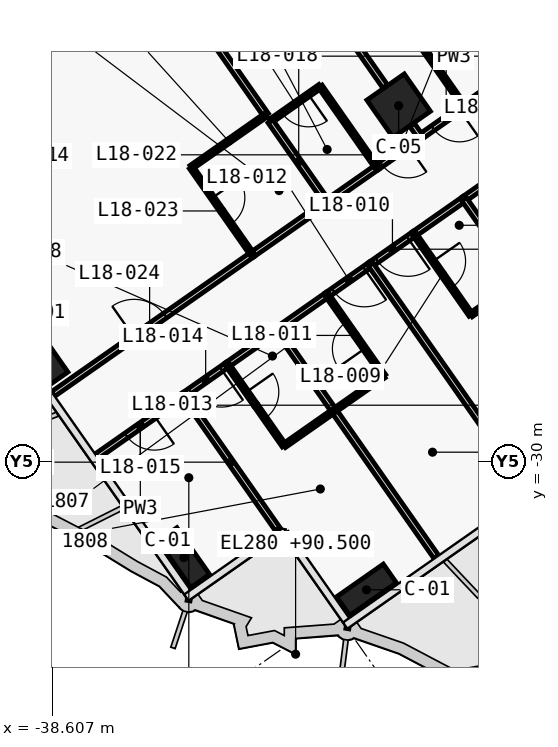
"""IFC4 building model, lengths in metres.
Left out: names, types, materials, properties, quantities, classifications, styles, units other than length and angle.
Written with IfcOpenShell. Run it as: python <this file> out.ifc"""

import sys

from ifc_helpers import new_model, si_unit, direction, frame, frame_2d, origin, origin_2d, place, context, subcontext, project, spatial, rectangle, extrude, element, fill, save


model = new_model("IFC4")
c1 = context("Model", 3, precision=1e-05, world=origin(), true_north=direction((0.0, 1.0)))
c2 = subcontext(c1, "Body", "Model", "MODEL_VIEW")
j1 = project(units=[si_unit("LENGTHUNIT", "METRE"), si_unit("PLANEANGLEUNIT", "RADIAN")], contexts=[c1])
p1 = place(None, origin())
s1 = spatial("IfcSite", under=j1, at=p1, CompositionType="ELEMENT")
p2 = place(p1, origin())
s2 = spatial("IfcBuilding", under=s1, at=p2, CompositionType="ELEMENT")
p3 = place(p2, frame((0.0, 0.0, 90.5)))
s3 = spatial("IfcBuildingStorey", under=s2, at=p3, CompositionType="ELEMENT", Elevation=90.5)
for number, where, z_axis, x_axis in (
    (1, (-30.336, -33.388, 0.0), (0.0, 0.0, 1.0), (-0.819, -0.574, 0.0)),
    (2, (-35.14, -32.541, 0.0), (0.0, 0.0, 1.0), (-0.574, 0.819, 0.0)),
    (3, (-38.869, -27.216, 0.0), (0.0, 0.0, 1.0), (-0.574, 0.819, 0.0)),
):
    element("IfcColumn", number, at=place(p3, frame(where, z_axis=z_axis, x_axis=x_axis)), inside=s3, PredefinedType="COLUMN", context=c2, shape_type="SweptSolid", body=[
        extrude(rectangle(XDim=1.5, YDim=0.6, at=origin_2d()), origin(), (0.0, 0.0, 1.0), 3.6),
    ])
p4 = place(p3, frame((-29.49, -20.649, 0.0), z_axis=(0.0, 0.0, 1.0), x_axis=(-0.819152044289, -0.573576436351, 0.0)))
e4 = element("IfcColumn", 4, at=p4, inside=s3, PredefinedType="COLUMN", context=c2, shape_type="SweptSolid", body=[
    extrude(rectangle(XDim=1.2, YDim=1.2, at=origin_2d()), origin(), (0.0, 0.0, 1.0), 3.6),
])
p5 = place(p3, frame((-27.768, -20.664, 0.0), z_axis=(0.0, 0.0, 1.0), x_axis=(-0.81914197737, -0.573590813132, 0.0)))
e5 = element("IfcWall", 5, at=p5, inside=s3, PredefinedType="PARTITIONING", context=c2, shape_type="SweptSolid", body=[
    extrude(rectangle(XDim=1.403, YDim=0.15, at=frame_2d((0.701, 0.0))), origin(), (0.0, 0.0, 1.0), 2.6),
])
p6 = place(p5, frame((0.15, 0.0, 0.0)))
e6 = element("IfcOpeningElement", 6, at=p6, cuts=e5, PredefinedType="OPENING", context=c2, shape_type="SweptSolid", body=[
    extrude(rectangle(XDim=0.85, YDim=2.1, at=frame_2d((0.425, 1.05))), frame((0.0, 0.085, 0.0), z_axis=(0.0, -1.0, 0.0), x_axis=(1.0, 0.0, 0.0)), (0.0, 0.0, 1.0), 0.17),
])
p7 = place(p3, frame((-27.771, -20.666, 0.0), z_axis=(0.0, 0.0, 1.0), x_axis=(0.819189013667, 0.573523634986, 0.0)))
e7 = element("IfcWall", 7, at=p7, inside=s3, PredefinedType="PARTITIONING", context=c2, shape_type="SweptSolid", body=[
    extrude(rectangle(XDim=1.604, YDim=0.15, at=frame_2d((0.802, 0.0))), origin(), (0.0, 0.0, 1.0), 3.32),
])
p8 = place(p3, frame((-28.914, -21.467, 0.0), z_axis=(0.0, 0.0, 1.0), x_axis=(-0.81914197737, -0.573590813132, 0.0)))
e8 = element("IfcWall", 8, at=p8, inside=s3, PredefinedType="PARTITIONING", context=c2, shape_type="SweptSolid", body=[
    extrude(rectangle(XDim=1.403, YDim=0.15, at=frame_2d((0.701, 0.0))), origin(), (0.0, 0.0, 1.0), 2.6),
])
p9 = place(p8, frame((0.403, 0.0, 0.0)))
e9 = element("IfcOpeningElement", 9, at=p9, cuts=e8, PredefinedType="OPENING", context=c2, shape_type="SweptSolid", body=[
    extrude(rectangle(XDim=0.85, YDim=2.1, at=frame_2d((0.425, 1.05))), frame((0.0, 0.085, 0.0), z_axis=(0.0, -1.0, 0.0), x_axis=(1.0, 0.0, 0.0)), (0.0, 0.0, 1.0), 0.17),
])
p10 = place(p3, frame((-31.375, -23.19, 0.0), z_axis=(0.0, 0.0, 1.0), x_axis=(0.819189013667, 0.573523634986, 0.0)))
e10 = element("IfcWall", 10, at=p10, inside=s3, PredefinedType="PARTITIONING", context=c2, shape_type="SweptSolid", body=[
    extrude(rectangle(XDim=1.604, YDim=0.15, at=frame_2d((0.802, 0.0))), origin(), (0.0, 0.0, 1.0), 3.32),
])
p11 = place(p3, frame((-38.582, -28.236, 0.0), z_axis=(0.0, 0.0, 1.0), x_axis=(0.819158447199, 0.573567291939, 0.0)))
e11 = element("IfcWall", 11, at=p11, inside=s3, PredefinedType="PARTITIONING", context=c2, shape_type="SweptSolid", body=[
    extrude(rectangle(XDim=6.401, YDim=0.15, at=frame_2d((3.2, 0.0))), origin(), (0.0, 0.0, 1.0), 2.5),
])
p12 = place(p11, frame((2.6, 0.0, 0.0)))
e12 = element("IfcOpeningElement", 12, at=p12, cuts=e11, PredefinedType="OPENING", context=c2, shape_type="SweptSolid", body=[
    extrude(rectangle(XDim=1.0, YDim=2.1, at=frame_2d((0.5, 1.05))), frame((0.0, 0.085, 0.0), z_axis=(0.0, -1.0, 0.0), x_axis=(1.0, 0.0, 0.0)), (0.0, 0.0, 1.0), 0.17),
])
p13 = place(p3, frame((-33.341, -24.566, 0.0), z_axis=(0.0, 0.0, 1.0), x_axis=(0.819179439794, 0.573537309527, 0.0)))
e13 = element("IfcWall", 13, at=p13, inside=s3, PredefinedType="PARTITIONING", context=c2, shape_type="SweptSolid", body=[
    extrude(rectangle(XDim=2.404, YDim=0.15, at=frame_2d((1.202, 0.0))), origin(), (0.0, 0.0, 1.0), 3.32),
])
p14 = place(p3, frame((-25.801, -21.729, 0.0), z_axis=(0.0, 0.0, 1.0), x_axis=(-0.819179439794, -0.573537309527, 0.0)))
e14 = element("IfcWall", 14, at=p14, inside=s3, PredefinedType="PARTITIONING", context=c2, shape_type="SweptSolid", body=[
    extrude(rectangle(XDim=2.404, YDim=0.15, at=frame_2d((1.202, 0.0))), origin(), (0.0, 0.0, 1.0), 2.6),
])
p15 = place(p3, frame((-29.079, -24.023, 0.0), z_axis=(0.0, 0.0, 1.0), x_axis=(-0.81914197737, -0.573590813132, 0.0)))
e15 = element("IfcWall", 15, at=p15, inside=s3, PredefinedType="PARTITIONING", context=c2, shape_type="SweptSolid", body=[
    extrude(rectangle(XDim=1.403, YDim=0.15, at=frame_2d((0.701, 0.0))), origin(), (0.0, 0.0, 1.0), 3.32),
])
p16 = place(p15, frame((0.201, 0.0, 0.0)))
e16 = element("IfcOpeningElement", 16, at=p16, cuts=e15, PredefinedType="OPENING", context=c2, shape_type="SweptSolid", body=[
    extrude(rectangle(XDim=1.0, YDim=2.1, at=frame_2d((0.5, 1.05))), frame((0.0, 0.085, 0.0), z_axis=(0.0, -1.0, 0.0), x_axis=(1.0, 0.0, 0.0)), (0.0, 0.0, 1.0), 0.17),
])
p17 = place(p3, frame((-27.767, -23.105, 0.0), z_axis=(0.0, 0.0, 1.0), x_axis=(-0.819117502046, -0.573625764625, 0.0)))
e17 = element("IfcWall", 17, at=p17, inside=s3, PredefinedType="PARTITIONING", context=c2, shape_type="SweptSolid", body=[
    extrude(rectangle(XDim=1.604, YDim=0.15, at=frame_2d((0.802, 0.0))), origin(), (0.0, 0.0, 1.0), 2.6),
])
p18 = place(p3, frame((-30.225, -24.826, 0.0), z_axis=(0.0, 0.0, 1.0), x_axis=(-0.819060210533, -0.573707566205, 0.0)))
e18 = element("IfcWall", 18, at=p18, inside=s3, PredefinedType="PARTITIONING", context=c2, shape_type="SweptSolid", body=[
    extrude(rectangle(XDim=1.403, YDim=0.15, at=frame_2d((0.702, 0.0))), origin(), (0.0, 0.0, 1.0), 3.32),
])
p19 = place(p18, frame((0.202, 0.0, 0.0)))
e19 = element("IfcOpeningElement", 19, at=p19, cuts=e18, PredefinedType="OPENING", context=c2, shape_type="SweptSolid", body=[
    extrude(rectangle(XDim=1.0, YDim=2.1, at=frame_2d((0.5, 1.05))), frame((0.0, 0.085, 0.0), z_axis=(0.0, -1.0, 0.0), x_axis=(1.0, 0.0, 0.0)), (0.0, 0.0, 1.0), 0.17),
])
p20 = place(p3, frame((-31.371, -25.629, 0.0), z_axis=(0.0, 0.0, 1.0), x_axis=(-0.819189013667, -0.573523634986, 0.0)))
e20 = element("IfcWall", 20, at=p20, inside=s3, PredefinedType="PARTITIONING", context=c2, shape_type="SweptSolid", body=[
    extrude(rectangle(XDim=1.604, YDim=0.15, at=frame_2d((0.802, 0.0))), origin(), (0.0, 0.0, 1.0), 3.32),
])
p21 = place(p3, frame((-33.993, -27.465, 0.0), z_axis=(0.0, 0.0, 1.0), x_axis=(-0.819199220913, -0.573509055252, 0.0)))
e21 = element("IfcWall", 21, at=p21, inside=s3, PredefinedType="PARTITIONING", context=c2, shape_type="SweptSolid", body=[
    extrude(rectangle(XDim=1.403, YDim=0.15, at=frame_2d((0.702, 0.0))), origin(), (0.0, 0.0, 1.0), 3.32),
])
p22 = place(p21, frame((0.201, 0.0, 0.0)))
e22 = element("IfcOpeningElement", 22, at=p22, cuts=e21, PredefinedType="OPENING", context=c2, shape_type="SweptSolid", body=[
    extrude(rectangle(XDim=1.0, YDim=2.1, at=frame_2d((0.5, 1.05))), frame((0.0, 0.085, 0.0), z_axis=(0.0, -1.0, 0.0), x_axis=(1.0, 0.0, 0.0)), (0.0, 0.0, 1.0), 0.17),
])
p23 = place(p3, frame((-32.682, -26.546, 0.0), z_axis=(0.0, 0.0, 1.0), x_axis=(-0.819117502046, -0.573625764625, 0.0)))
e23 = element("IfcWall", 23, at=p23, inside=s3, PredefinedType="PARTITIONING", context=c2, shape_type="SweptSolid", body=[
    extrude(rectangle(XDim=1.604, YDim=0.15, at=frame_2d((0.802, 0.0))), origin(), (0.0, 0.0, 1.0), 3.32),
])
p24 = place(p3, frame((-35.139, -28.267, 0.0), z_axis=(0.0, 0.0, 1.0), x_axis=(-0.819125488359, -0.573614360281, 0.0)))
e24 = element("IfcWall", 24, at=p24, inside=s3, PredefinedType="PARTITIONING", context=c2, shape_type="SweptSolid", body=[
    extrude(rectangle(XDim=2.802, YDim=0.15, at=frame_2d((1.401, 0.0))), origin(), (0.0, 0.0, 1.0), 2.5),
])
p25 = place(p24, frame((0.951, 0.0, 0.0)))
e25 = element("IfcOpeningElement", 25, at=p25, cuts=e24, PredefinedType="OPENING", context=c2, shape_type="SweptSolid", body=[
    extrude(rectangle(XDim=0.9, YDim=2.1, at=frame_2d((0.45, 1.05))), frame((0.0, 0.085, 0.0), z_axis=(0.0, -1.0, 0.0), x_axis=(1.0, 0.0, 0.0)), (0.0, 0.0, 1.0), 0.17),
])
p26 = place(p3, frame((-26.458, -19.747, 0.0), z_axis=(0.0, 0.0, 1.0), x_axis=(-0.573544201094, 0.819174614714, 0.0)))
e26 = element("IfcWall", 26, at=p26, inside=s3, PredefinedType="PARTITIONING", context=c2, shape_type="SweptSolid", body=[
    extrude(rectangle(XDim=2.602, YDim=0.15, at=frame_2d((1.301, 0.0))), origin(), (0.0, 0.0, 1.0), 2.6),
])
p27 = place(p3, frame((-29.261, -18.536, 0.0), z_axis=(0.0, 0.0, 1.0), x_axis=(0.573537965655, -0.819178980414, 0.0)))
e27 = element("IfcWall", 27, at=p27, inside=s3, PredefinedType="PARTITIONING", context=c2, shape_type="SweptSolid", body=[
    extrude(rectangle(XDim=2.6, YDim=0.12, at=frame_2d((1.3, 0.0))), origin(), (0.0, 0.0, 1.0), 2.6),
])
p28 = place(p3, frame((-28.916, -21.468, 0.0), z_axis=(0.0, 0.0, 1.0), x_axis=(-0.572944929411, 0.819593867633, 0.0)))
e28 = element("IfcWall", 28, at=p28, inside=s3, PredefinedType="PARTITIONING", context=c2, shape_type="SweptSolid", body=[
    extrude(rectangle(XDim=0.38, YDim=0.15, at=frame_2d((0.19, 0.0))), origin(), (0.0, 0.0, 1.0), 2.6),
])
p29 = place(p3, frame((-29.845, -20.141, 0.0), z_axis=(0.0, 0.0, 1.0), x_axis=(-0.573558725113, 0.819164445546, 0.0)))
e29 = element("IfcWall", 29, at=p29, inside=s3, PredefinedType="PARTITIONING", context=c2, shape_type="SweptSolid", body=[
    extrude(rectangle(XDim=9.01, YDim=0.15, at=frame_2d((4.505, 0.0))), origin(), (0.0, 0.0, 1.0), 2.6),
])
p30 = place(p3, frame((-30.062, -22.27, 0.0), z_axis=(0.0, 0.0, 1.0), x_axis=(-0.573537965655, 0.819178980414, 0.0)))
e30 = element("IfcWall", 30, at=p30, inside=s3, PredefinedType="PARTITIONING", context=c2, shape_type="SweptSolid", body=[
    extrude(rectangle(XDim=2.6, YDim=0.12, at=frame_2d((1.3, 0.0))), origin(), (0.0, 0.0, 1.0), 2.6),
])
p31 = place(p3, frame((-31.555, -20.14, 0.0), z_axis=(0.0, 0.0, 1.0), x_axis=(-0.819131543282, -0.57360571371, 0.0)))
e31 = element("IfcWall", 31, at=p31, inside=s3, PredefinedType="PARTITIONING", context=c2, shape_type="SweptSolid", body=[
    extrude(rectangle(XDim=1.6, YDim=0.12, at=frame_2d((0.8, 0.0))), origin(), (0.0, 0.0, 1.0), 3.32),
])
p32 = place(p31, frame((0.375, 0.0, 0.0)))
e32 = element("IfcOpeningElement", 32, at=p32, cuts=e31, PredefinedType="OPENING", context=c2, shape_type="SweptSolid", body=[
    extrude(rectangle(XDim=0.85, YDim=2.05, at=frame_2d((0.425, 1.025))), frame((0.0, 0.07, 0.0), z_axis=(0.0, -1.0, 0.0), x_axis=(1.0, 0.0, 0.0)), (0.0, 0.0, 1.0), 0.14),
])
p33 = place(p3, frame((-32.979, -20.896, 0.0), z_axis=(0.0, 0.0, 1.0), x_axis=(-0.573576058406, 0.819152308929, 0.0)))
e33 = element("IfcWall", 33, at=p33, inside=s3, PredefinedType="PARTITIONING", context=c2, shape_type="SweptSolid", body=[
    extrude(rectangle(XDim=8.501, YDim=0.15, at=frame_2d((4.25, 0.0))), origin(), (0.0, 0.0, 1.0), 2.5),
])
p34 = place(p3, frame((-31.373, -23.189, 0.0), z_axis=(0.0, 0.0, 1.0), x_axis=(-0.573600972199, 0.819134863556, 0.0)))
e34 = element("IfcWall", 34, at=p34, inside=s3, PredefinedType="PARTITIONING", context=c2, shape_type="SweptSolid", body=[
    extrude(rectangle(XDim=2.6, YDim=0.15, at=frame_2d((1.3, 0.0))), origin(), (0.0, 0.0, 1.0), 2.6),
])
p35 = place(p3, frame((-32.98, -20.894, 0.0), z_axis=(0.0, 0.0, 1.0), x_axis=(-0.819155442668, -0.573571582932, 0.0)))
e35 = element("IfcWall", 35, at=p35, inside=s3, PredefinedType="PARTITIONING", context=c2, shape_type="SweptSolid", body=[
    extrude(rectangle(XDim=2.4, YDim=0.12, at=frame_2d((1.2, 0.0))), origin(), (0.0, 0.0, 1.0), 3.32),
])
p36 = place(p3, frame((-34.946, -22.272, 0.0), z_axis=(0.0, 0.0, 1.0), x_axis=(0.573608623498, -0.819129505664, 0.0)))
e36 = element("IfcWall", 36, at=p36, inside=s3, PredefinedType="PARTITIONING", context=c2, shape_type="SweptSolid", body=[
    extrude(rectangle(XDim=2.8, YDim=0.12, at=frame_2d((1.4, 0.0))), origin(), (0.0, 0.0, 1.0), 2.6),
])
p37 = place(p36, frame((0.975, 0.0, 0.0)))
e37 = element("IfcOpeningElement", 37, at=p37, cuts=e36, PredefinedType="OPENING", context=c2, shape_type="SweptSolid", body=[
    extrude(rectangle(XDim=0.85, YDim=2.05, at=frame_2d((0.425, 1.025))), frame((0.0, 0.07, 0.0), z_axis=(0.0, -1.0, 0.0), x_axis=(1.0, 0.0, 0.0)), (0.0, 0.0, 1.0), 0.14),
])
p38 = place(p3, frame((-26.276, -25.238, 0.0), z_axis=(0.0, 0.0, 1.0), x_axis=(-0.573588285102, 0.819143747577, 0.0)))
e38 = element("IfcWall", 38, at=p38, inside=s3, PredefinedType="PARTITIONING", context=c2, shape_type="SweptSolid", body=[
    extrude(rectangle(XDim=2.602, YDim=0.15, at=frame_2d((1.301, 0.0))), origin(), (0.0, 0.0, 1.0), 2.6),
])
p39 = place(p3, frame((-29.08, -24.024, 0.0), z_axis=(0.0, 0.0, 1.0), x_axis=(0.573537965655, -0.819178980414, 0.0)))
e39 = element("IfcWall", 39, at=p39, inside=s3, PredefinedType="PARTITIONING", context=c2, shape_type="SweptSolid", body=[
    extrude(rectangle(XDim=2.6, YDim=0.12, at=frame_2d((1.3, 0.0))), origin(), (0.0, 0.0, 1.0), 3.32),
])
p40 = place(p39, frame((0.875, 0.0, 0.0)))
e40 = element("IfcOpeningElement", 40, at=p40, cuts=e39, PredefinedType="OPENING", context=c2, shape_type="SweptSolid", body=[
    extrude(rectangle(XDim=0.85, YDim=2.05, at=frame_2d((0.425, 1.025))), frame((0.0, 0.07, 0.0), z_axis=(0.0, -1.0, 0.0), x_axis=(1.0, 0.0, 0.0)), (0.0, 0.0, 1.0), 0.14),
])
p41 = place(p3, frame((-27.587, -26.155, 0.0), z_axis=(0.0, 0.0, 1.0), x_axis=(0.819131543282, 0.57360571371, 0.0)))
e41 = element("IfcWall", 41, at=p41, inside=s3, PredefinedType="PARTITIONING", context=c2, shape_type="SweptSolid", body=[
    extrude(rectangle(XDim=1.6, YDim=0.12, at=frame_2d((0.8, 0.0))), origin(), (0.0, 0.0, 1.0), 2.6),
])
p42 = place(p3, frame((-26.039, -30.807, 0.0), z_axis=(0.0, 0.0, 1.0), x_axis=(-0.573594765376, 0.819139209862, 0.0)))
e42 = element("IfcWall", 42, at=p42, inside=s3, PredefinedType="PARTITIONING", context=c2, shape_type="SweptSolid", body=[
    extrude(rectangle(XDim=7.3, YDim=0.15, at=frame_2d((3.65, 0.0))), origin(), (0.0, 0.0, 1.0), 2.5),
])
p43 = place(p3, frame((-31.192, -28.678, 0.0), z_axis=(0.0, 0.0, 1.0), x_axis=(0.81918174131, 0.573534022273, 0.0)))
e43 = element("IfcWall", 43, at=p43, inside=s3, PredefinedType="PARTITIONING", context=c2, shape_type="SweptSolid", body=[
    extrude(rectangle(XDim=1.6, YDim=0.12, at=frame_2d((0.8, 0.0))), origin(), (0.0, 0.0, 1.0), 3.32),
])
p44 = place(p3, frame((-29.881, -27.759, 0.0), z_axis=(0.0, 0.0, 1.0), x_axis=(-0.573600972199, 0.819134863556, 0.0)))
e44 = element("IfcWall", 44, at=p44, inside=s3, PredefinedType="PARTITIONING", context=c2, shape_type="SweptSolid", body=[
    extrude(rectangle(XDim=2.6, YDim=0.12, at=frame_2d((1.3, 0.0))), origin(), (0.0, 0.0, 1.0), 3.32),
])
p45 = place(p44, frame((0.875, 0.0, 0.0)))
e45 = element("IfcOpeningElement", 45, at=p45, cuts=e44, PredefinedType="OPENING", context=c2, shape_type="SweptSolid", body=[
    extrude(rectangle(XDim=0.85, YDim=2.05, at=frame_2d((0.425, 1.025))), frame((0.0, 0.07, 0.0), z_axis=(0.0, -1.0, 0.0), x_axis=(1.0, 0.0, 0.0)), (0.0, 0.0, 1.0), 0.14),
])
p46 = place(p3, frame((-28.497, -32.528, 0.0), z_axis=(0.0, 0.0, 1.0), x_axis=(-0.573570431261, 0.819156249066, 0.0)))
e46 = element("IfcWall", 46, at=p46, inside=s3, PredefinedType="PARTITIONING", context=c2, shape_type="SweptSolid", body=[
    extrude(rectangle(XDim=4.699, YDim=0.15, at=frame_2d((2.35, 0.0))), origin(), (0.0, 0.0, 1.0), 2.5),
])
p47 = place(p3, frame((-31.192, -28.677, 0.0), z_axis=(0.0, 0.0, 1.0), x_axis=(-0.573537965655, 0.819178980414, 0.0)))
e47 = element("IfcWall", 47, at=p47, inside=s3, PredefinedType="PARTITIONING", context=c2, shape_type="SweptSolid", body=[
    extrude(rectangle(XDim=2.6, YDim=0.15, at=frame_2d((1.3, 0.0))), origin(), (0.0, 0.0, 1.0), 3.32),
])
p48 = place(p3, frame((-33.995, -27.466, 0.0), z_axis=(0.0, 0.0, 1.0), x_axis=(0.573582085028, -0.819148089014, 0.0)))
e48 = element("IfcWall", 48, at=p48, inside=s3, PredefinedType="PARTITIONING", context=c2, shape_type="SweptSolid", body=[
    extrude(rectangle(XDim=2.6, YDim=0.12, at=frame_2d((1.3, 0.0))), origin(), (0.0, 0.0, 1.0), 3.32),
])
p49 = place(p48, frame((0.875, 0.0, 0.0)))
e49 = element("IfcOpeningElement", 49, at=p49, cuts=e48, PredefinedType="OPENING", context=c2, shape_type="SweptSolid", body=[
    extrude(rectangle(XDim=0.85, YDim=2.05, at=frame_2d((0.425, 1.025))), frame((0.0, 0.07, 0.0), z_axis=(0.0, -1.0, 0.0), x_axis=(1.0, 0.0, 0.0)), (0.0, 0.0, 1.0), 0.14),
])
p50 = place(p3, frame((-32.502, -29.596, 0.0), z_axis=(0.0, 0.0, 1.0), x_axis=(0.819131543282, 0.57360571371, 0.0)))
e50 = element("IfcWall", 50, at=p50, inside=s3, PredefinedType="PARTITIONING", context=c2, shape_type="SweptSolid", body=[
    extrude(rectangle(XDim=1.6, YDim=0.12, at=frame_2d((0.8, 0.0))), origin(), (0.0, 0.0, 1.0), 3.32),
])
p51 = place(p3, frame((-32.675, -31.791, 0.0), z_axis=(0.0, 0.0, 1.0), x_axis=(-0.573553792486, 0.819167899227, 0.0)))
e51 = element("IfcWall", 51, at=p51, inside=s3, PredefinedType="PARTITIONING", context=c2, shape_type="SweptSolid", body=[
    extrude(rectangle(XDim=4.3, YDim=0.15, at=frame_2d((2.15, 0.0))), origin(), (0.0, 0.0, 1.0), 3.32),
])
p52 = place(p40, origin())
e52 = element("IfcDoor", 52, at=p52, inside=s3, OperationType="SINGLE_SWING_RIGHT", PredefinedType="DOOR", context=c2, shape_type="SweptSolid", body=[
    extrude(rectangle(XDim=0.85, YDim=2.05, at=frame_2d((0.425, 1.025))), frame((0.0, 0.025, 0.0), z_axis=(0.0, -1.0, 0.0), x_axis=(1.0, 0.0, 0.0)), (0.0, 0.0, 1.0), 0.05),
])
fill(e40, e52)
p53 = place(p16, origin())
e53 = element("IfcDoor", 53, at=p53, inside=s3, OperationType="SINGLE_SWING_LEFT", PredefinedType="DOOR", context=c2, shape_type="SweptSolid", body=[
    extrude(rectangle(XDim=1.0, YDim=2.1, at=frame_2d((0.5, 1.05))), frame((0.0, 0.025, 0.0), z_axis=(0.0, -1.0, 0.0), x_axis=(1.0, 0.0, 0.0)), (0.0, 0.0, 1.0), 0.05),
])
fill(e16, e53)
p54 = place(p45, origin())
e54 = element("IfcDoor", 54, at=p54, inside=s3, OperationType="SINGLE_SWING_RIGHT", PredefinedType="DOOR", context=c2, shape_type="SweptSolid", body=[
    extrude(rectangle(XDim=0.85, YDim=2.05, at=frame_2d((0.425, 1.025))), frame((0.0, 0.025, 0.0), z_axis=(0.0, -1.0, 0.0), x_axis=(1.0, 0.0, 0.0)), (0.0, 0.0, 1.0), 0.05),
])
fill(e45, e54)
p55 = place(p19, origin())
e55 = element("IfcDoor", 55, at=p55, inside=s3, OperationType="SINGLE_SWING_LEFT", PredefinedType="DOOR", context=c2, shape_type="SweptSolid", body=[
    extrude(rectangle(XDim=1.0, YDim=2.1, at=frame_2d((0.5, 1.05))), frame((0.0, 0.025, 0.0), z_axis=(0.0, -1.0, 0.0), x_axis=(1.0, 0.0, 0.0)), (0.0, 0.0, 1.0), 0.05),
])
fill(e19, e55)
p56 = place(p49, origin())
e56 = element("IfcDoor", 56, at=p56, inside=s3, OperationType="SINGLE_SWING_RIGHT", PredefinedType="DOOR", context=c2, shape_type="SweptSolid", body=[
    extrude(rectangle(XDim=0.85, YDim=2.05, at=frame_2d((0.425, 1.025))), frame((0.0, 0.025, 0.0), z_axis=(0.0, -1.0, 0.0), x_axis=(1.0, 0.0, 0.0)), (0.0, 0.0, 1.0), 0.05),
])
fill(e49, e56)
p57 = place(p22, origin())
e57 = element("IfcDoor", 57, at=p57, inside=s3, OperationType="SINGLE_SWING_LEFT", PredefinedType="DOOR", context=c2, shape_type="SweptSolid", body=[
    extrude(rectangle(XDim=1.0, YDim=2.1, at=frame_2d((0.5, 1.05))), frame((0.0, 0.025, 0.0), z_axis=(0.0, -1.0, 0.0), x_axis=(1.0, 0.0, 0.0)), (0.0, 0.0, 1.0), 0.05),
])
fill(e22, e57)
p58 = place(p25, origin())
e58 = element("IfcDoor", 58, at=p58, inside=s3, OperationType="SINGLE_SWING_LEFT", PredefinedType="DOOR", context=c2, shape_type="SweptSolid", body=[
    extrude(rectangle(XDim=0.9, YDim=2.1, at=frame_2d((0.45, 1.05))), frame((0.0, 0.025, 0.0), z_axis=(0.0, -1.0, 0.0), x_axis=(1.0, 0.0, 0.0)), (0.0, 0.0, 1.0), 0.05),
])
fill(e25, e58)
p59 = place(p6, origin())
e59 = element("IfcDoor", 59, at=p59, inside=s3, OperationType="SINGLE_SWING_LEFT", PredefinedType="DOOR", context=c2, shape_type="SweptSolid", body=[
    extrude(rectangle(XDim=0.85, YDim=2.1, at=frame_2d((0.425, 1.05))), frame((0.0, 0.025, 0.0), z_axis=(0.0, -1.0, 0.0), x_axis=(1.0, 0.0, 0.0)), (0.0, 0.0, 1.0), 0.05),
])
fill(e6, e59)
p60 = place(p32, origin())
e60 = element("IfcDoor", 60, at=p60, inside=s3, OperationType="SINGLE_SWING_LEFT", PredefinedType="DOOR", context=c2, shape_type="SweptSolid", body=[
    extrude(rectangle(XDim=0.85, YDim=2.05, at=frame_2d((0.425, 1.025))), frame((0.0, 0.025, 0.0), z_axis=(0.0, -1.0, 0.0), x_axis=(1.0, 0.0, 0.0)), (0.0, 0.0, 1.0), 0.05),
])
fill(e32, e60)
p61 = place(p9, origin())
e61 = element("IfcDoor", 61, at=p61, inside=s3, OperationType="SINGLE_SWING_RIGHT", PredefinedType="DOOR", context=c2, shape_type="SweptSolid", body=[
    extrude(rectangle(XDim=0.85, YDim=2.1, at=frame_2d((0.425, 1.05))), frame((0.0, 0.025, 0.0), z_axis=(0.0, -1.0, 0.0), x_axis=(1.0, 0.0, 0.0)), (0.0, 0.0, 1.0), 0.05),
])
fill(e9, e61)
p62 = place(p37, origin())
e62 = element("IfcDoor", 62, at=p62, inside=s3, OperationType="SINGLE_SWING_LEFT", PredefinedType="DOOR", context=c2, shape_type="SweptSolid", body=[
    extrude(rectangle(XDim=0.85, YDim=2.05, at=frame_2d((0.425, 1.025))), frame((0.0, 0.025, 0.0), z_axis=(0.0, -1.0, 0.0), x_axis=(1.0, 0.0, 0.0)), (0.0, 0.0, 1.0), 0.05),
])
fill(e37, e62)
p63 = place(p12, origin())
e63 = element("IfcDoor", 63, at=p63, inside=s3, OperationType="SINGLE_SWING_RIGHT", PredefinedType="DOOR", context=c2, shape_type="SweptSolid", body=[
    extrude(rectangle(XDim=1.0, YDim=2.1, at=frame_2d((0.5, 1.05))), frame((0.0, 0.025, 0.0), z_axis=(0.0, -1.0, 0.0), x_axis=(1.0, 0.0, 0.0)), (0.0, 0.0, 1.0), 0.05),
])
fill(e12, e63)
save(model, sys.argv[1])
